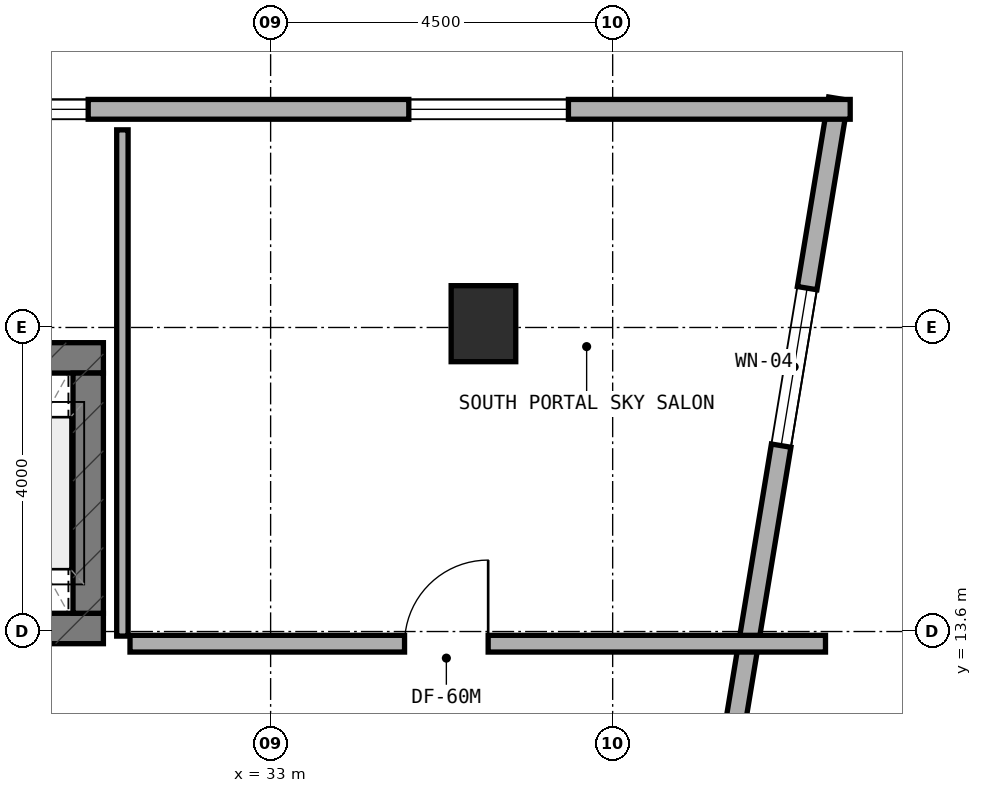
"""IFC4 building model, lengths in metres.
Left out: names, types, materials, properties, quantities, classifications, styles, units other than length and angle.
Written with IfcOpenShell. Run it as: python <this file> out.ifc"""

import sys

from ifc_helpers import new_model, si_unit, direction, frame, frame_2d, origin, origin_2d, place, context, subcontext, project, spatial, rectangle, extrude, element, fill, save


model = new_model("IFC4")
c1 = context("Model", 3, precision=1e-05, world=origin(), true_north=direction((0.0, 1.0)))
c2 = subcontext(c1, "Body", "Model", "MODEL_VIEW")
j1 = project(units=[si_unit("LENGTHUNIT", "METRE"), si_unit("PLANEANGLEUNIT", "RADIAN")], contexts=[c1])
p1 = place(None, origin())
s1 = spatial("IfcSite", under=j1, at=p1, CompositionType="ELEMENT")
p2 = place(p1, origin())
s2 = spatial("IfcBuilding", under=s1, at=p2, CompositionType="ELEMENT")
p3 = place(p2, frame((0.0, 0.0, 181.1)))
s3 = spatial("IfcBuildingStorey", under=s2, at=p3, CompositionType="ELEMENT", Elevation=181.1)
p4 = place(p3, frame((6.4, 13.64, 0.0), z_axis=(0.0, 0.0, 1.0), x_axis=(1.0, 0.0, 0.0)))
e1 = element("IfcWall", 1, at=p4, inside=s3, PredefinedType="SHEAR", context=c2, shape_type="SweptSolid", body=[
    extrude(rectangle(XDim=24.4, YDim=0.4, at=frame_2d((12.2, 0.0))), origin(), (0.0, 0.0, 1.0), 3.6),
])
p5 = place(p4, frame((9.15, 0.0, 0.0)))
e2 = element("IfcOpeningElement", 2, at=p5, cuts=e1, PredefinedType="OPENING", context=c2, shape_type="SweptSolid", body=[
    extrude(rectangle(XDim=1.2, YDim=2.15, at=frame_2d((0.6, 1.075))), frame((0.0, 0.21, 0.0), z_axis=(0.0, -1.0, 0.0), x_axis=(1.0, 0.0, 0.0)), (0.0, 0.0, 1.0), 0.42),
])
p6 = place(p4, frame((17.22, 0.0, 0.0)))
e3 = element("IfcOpeningElement", 3, at=p6, cuts=e1, PredefinedType="OPENING", context=c2, shape_type="SweptSolid", body=[
    extrude(rectangle(XDim=0.85, YDim=2.1, at=frame_2d((0.425, 1.05))), frame((0.0, 0.21, 0.0), z_axis=(0.0, -1.0, 0.0), x_axis=(1.0, 0.0, 0.0)), (0.0, 0.0, 1.0), 0.42),
])
p7 = place(p4, frame((18.783, 0.0, 0.0)))
e4 = element("IfcOpeningElement", 4, at=p7, cuts=e1, PredefinedType="OPENING", context=c2, shape_type="SweptSolid", body=[
    extrude(rectangle(XDim=1.1, YDim=2.15, at=frame_2d((0.55, 1.075))), frame((0.0, 0.21, 0.0), z_axis=(0.0, -1.0, 0.0), x_axis=(1.0, 0.0, 0.0)), (0.0, 0.0, 1.0), 0.42),
])
p8 = place(p4, frame((20.65, 0.0, 0.0)))
e5 = element("IfcOpeningElement", 5, at=p8, cuts=e1, PredefinedType="OPENING", context=c2, shape_type="SweptSolid", body=[
    extrude(rectangle(XDim=1.1, YDim=2.15, at=frame_2d((0.55, 1.075))), frame((0.0, 0.21, 0.0), z_axis=(0.0, -1.0, 0.0), x_axis=(1.0, 0.0, 0.0)), (0.0, 0.0, 1.0), 0.42),
])
p9 = place(p4, frame((22.517, 0.0, 0.0)))
e6 = element("IfcOpeningElement", 6, at=p9, cuts=e1, PredefinedType="OPENING", context=c2, shape_type="SweptSolid", body=[
    extrude(rectangle(XDim=1.1, YDim=2.15, at=frame_2d((0.55, 1.075))), frame((0.0, 0.21, 0.0), z_axis=(0.0, -1.0, 0.0), x_axis=(1.0, 0.0, 0.0)), (0.0, 0.0, 1.0), 0.42),
])
p10 = place(p3, frame((6.4, 17.2, 0.0), z_axis=(0.0, 0.0, 1.0), x_axis=(1.0, 0.0, 0.0)))
e7 = element("IfcWall", 7, at=p10, inside=s3, PredefinedType="SHEAR", context=c2, shape_type="SweptSolid", body=[
    extrude(rectangle(XDim=24.4, YDim=0.4, at=frame_2d((12.2, 0.0))), origin(), (0.0, 0.0, 1.0), 3.6),
])
p11 = place(p3, frame((30.6, 13.84, 0.0), z_axis=(0.0, 0.0, 1.0), x_axis=(0.0, 1.0, 0.0)))
e8 = element("IfcWall", 8, at=p11, inside=s3, PredefinedType="SHEAR", context=c2, shape_type="SweptSolid", body=[
    extrude(rectangle(XDim=3.16, YDim=0.4, at=frame_2d((1.58, 0.0))), origin(), (0.0, 0.0, 1.0), 3.6),
])
p12 = place(p3, frame((35.8, 17.65, 0.0), z_axis=(0.0, 0.0, 1.0), x_axis=(1.0, 0.0, 0.0)))
e9 = element("IfcColumn", 9, at=p12, inside=s3, PredefinedType="COLUMN", context=c2, shape_type="SweptSolid", body=[
    extrude(rectangle(XDim=0.85, YDim=1.0, at=origin_2d()), origin(), (0.0, 0.0, 1.0), 3.6),
])
p13 = place(p3, frame((38.771, 10.313, 0.0), z_axis=(0.0, 0.0, 1.0), x_axis=(0.16277908586, 0.986662540693, 0.0)))
e10 = element("IfcWall", 10, at=p13, inside=s3, PredefinedType="STANDARD", context=c2, shape_type="SweptSolid", body=[
    extrude(rectangle(XDim=10.437, YDim=0.26, at=frame_2d((5.219, 0.0))), origin(), (0.0, 0.0, 1.0), 3.32),
])
p14 = place(p13, frame((5.81, 0.0, 0.85)))
e11 = element("IfcOpeningElement", 11, at=p14, cuts=e10, PredefinedType="OPENING", context=c2, shape_type="SweptSolid", body=[
    extrude(rectangle(XDim=2.1, YDim=1.5, at=frame_2d((1.05, 0.75))), frame((0.0, 0.14, 0.0), z_axis=(0.0, -1.0, 0.0), x_axis=(1.0, 0.0, 0.0)), (0.0, 0.0, 1.0), 0.28),
])
p15 = place(p3, frame((40.625, 20.47, 0.0), z_axis=(0.0, 0.0, 1.0), x_axis=(-1.0, 0.0, 0.0)))
e12 = element("IfcWall", 12, at=p15, inside=s3, PredefinedType="STANDARD", context=c2, shape_type="SweptSolid", body=[
    extrude(rectangle(XDim=12.215, YDim=0.26, at=frame_2d((6.107, 0.0))), origin(), (0.0, 0.0, 1.0), 2.995),
])
p16 = place(p15, frame((3.707, 0.0, 0.85)))
e13 = element("IfcOpeningElement", 13, at=p16, cuts=e12, PredefinedType="OPENING", context=c2, shape_type="SweptSolid", body=[
    extrude(rectangle(XDim=2.1, YDim=1.5, at=frame_2d((1.05, 0.75))), frame((0.0, 0.14, 0.0), z_axis=(0.0, -1.0, 0.0), x_axis=(1.0, 0.0, 0.0)), (0.0, 0.0, 1.0), 0.28),
])
p17 = place(p15, frame((10.025, 0.0, 0.85)))
e14 = element("IfcOpeningElement", 14, at=p17, cuts=e12, PredefinedType="OPENING", context=c2, shape_type="SweptSolid", body=[
    extrude(rectangle(XDim=1.8, YDim=1.5, at=frame_2d((0.9, 0.75))), frame((0.0, 0.14, 0.0), z_axis=(0.0, -1.0, 0.0), x_axis=(1.0, 0.0, 0.0)), (0.0, 0.0, 1.0), 0.28),
])
p18 = place(p3, frame((31.05, 13.54, 0.0), z_axis=(0.0, 0.0, 1.0), x_axis=(0.0, 1.0, 0.0)))
e15 = element("IfcWall", 15, at=p18, inside=s3, PredefinedType="PARTITIONING", context=c2, shape_type="SweptSolid", body=[
    extrude(rectangle(XDim=6.66, YDim=0.15, at=frame_2d((3.33, 0.0))), origin(), (0.0, 0.0, 1.0), 2.995),
])
p19 = place(p3, frame((31.15, 13.44, 0.0), z_axis=(0.0, 0.0, 1.0), x_axis=(1.0, 0.0, 0.0)))
e16 = element("IfcWall", 16, at=p19, inside=s3, PredefinedType="SOLIDWALL", context=c2, shape_type="SweptSolid", body=[
    extrude(rectangle(XDim=9.15, YDim=0.22, at=frame_2d((4.575, 0.0))), origin(), (0.0, 0.0, 1.0), 2.935),
])
p20 = place(p19, frame((3.612, 0.0, 0.0)))
e17 = element("IfcOpeningElement", 17, at=p20, cuts=e16, PredefinedType="OPENING", context=c2, shape_type="SweptSolid", body=[
    extrude(rectangle(XDim=1.1, YDim=2.1, at=frame_2d((0.55, 1.05))), frame((0.0, 0.12, 0.0), z_axis=(0.0, -1.0, 0.0), x_axis=(1.0, 0.0, 0.0)), (0.0, 0.0, 1.0), 0.24),
])
p21 = place(p14, origin())
e18 = element("IfcWindow", 18, at=p21, inside=s3, PartitioningType="SINGLE_PANEL", PredefinedType="WINDOW", context=c2, shape_type="SweptSolid", body=[
    extrude(rectangle(XDim=2.1, YDim=1.5, at=frame_2d((1.05, 0.75))), frame((0.0, 0.03, 0.0), z_axis=(0.0, -1.0, 0.0), x_axis=(1.0, 0.0, 0.0)), (0.0, 0.0, 1.0), 0.06),
])
fill(e11, e18)
p22 = place(p16, origin())
e19 = element("IfcWindow", 19, at=p22, inside=s3, PartitioningType="SINGLE_PANEL", PredefinedType="WINDOW", context=c2, shape_type="SweptSolid", body=[
    extrude(rectangle(XDim=2.1, YDim=1.5, at=frame_2d((1.05, 0.75))), frame((0.0, 0.03, 0.0), z_axis=(0.0, -1.0, 0.0), x_axis=(1.0, 0.0, 0.0)), (0.0, 0.0, 1.0), 0.06),
])
fill(e13, e19)
p23 = place(p17, origin())
e20 = element("IfcWindow", 20, at=p23, inside=s3, PartitioningType="SINGLE_PANEL", PredefinedType="WINDOW", context=c2, shape_type="SweptSolid", body=[
    extrude(rectangle(XDim=1.8, YDim=1.5, at=frame_2d((0.9, 0.75))), frame((0.0, 0.03, 0.0), z_axis=(0.0, -1.0, 0.0), x_axis=(1.0, 0.0, 0.0)), (0.0, 0.0, 1.0), 0.06),
])
fill(e14, e20)
p24 = place(p20, origin())
e21 = element("IfcDoor", 21, at=p24, inside=s3, OperationType="SINGLE_SWING_RIGHT", PredefinedType="DOOR", context=c2, shape_type="SweptSolid", body=[
    extrude(rectangle(XDim=1.1, YDim=2.1, at=frame_2d((0.55, 1.05))), frame((0.0, 0.025, 0.0), z_axis=(0.0, -1.0, 0.0), x_axis=(1.0, 0.0, 0.0)), (0.0, 0.0, 1.0), 0.05),
])
fill(e17, e21)
save(model, sys.argv[1])
